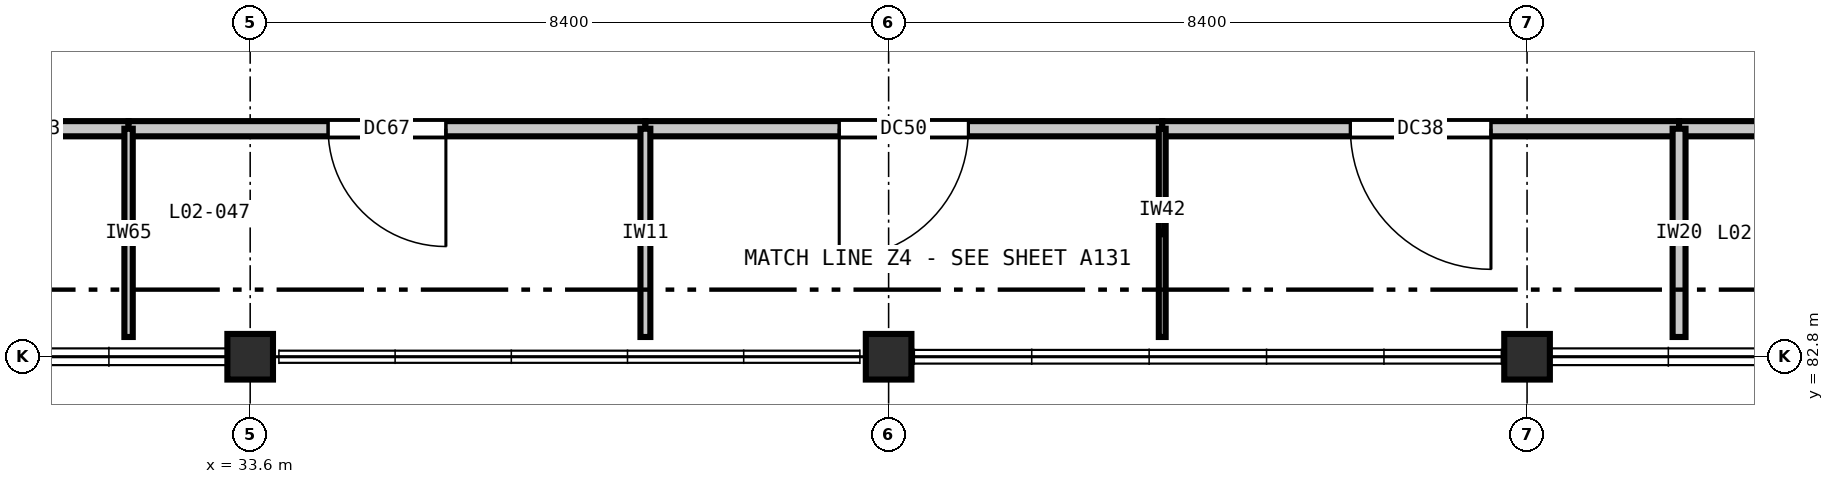
"""IFC4 building model, lengths in metres.
Left out: names, types, materials, properties, quantities, classifications, styles, units other than length and angle.
Written with IfcOpenShell. Run it as: python <this file> out.ifc"""

import sys

from ifc_helpers import new_model, si_unit, direction, frame, frame_2d, origin, origin_2d, place, context, subcontext, project, spatial, rectangle, extrude, element, fill, save


model = new_model("IFC4")
c1 = context("Model", 3, precision=1e-05, world=origin(), true_north=direction((0.0, 1.0)))
c2 = subcontext(c1, "Body", "Model", "MODEL_VIEW")
j1 = project(units=[si_unit("LENGTHUNIT", "METRE"), si_unit("PLANEANGLEUNIT", "RADIAN")], contexts=[c1])
p1 = place(None, origin())
s1 = spatial("IfcSite", under=j1, at=p1, CompositionType="ELEMENT")
p2 = place(p1, origin())
s2 = spatial("IfcBuilding", under=s1, at=p2, CompositionType="ELEMENT")
p3 = place(p2, frame((0.0, 0.0, 10.8)))
s3 = spatial("IfcBuildingStorey", under=s2, at=p3, CompositionType="ELEMENT", Elevation=10.8)
for number, where, z_axis, x_axis in (
    (1, (33.6, 82.8, 0.0), (0.0, 0.0, 1.0), (1.0, 0.0, 0.0)),
    (2, (42.0, 82.8, 0.0), (0.0, 0.0, 1.0), (1.0, 0.0, 0.0)),
    (3, (50.4, 82.8, 0.0), (0.0, 0.0, 1.0), (1.0, 0.0, 0.0)),
):
    element("IfcColumn", number, at=place(p3, frame(where, z_axis=z_axis, x_axis=x_axis)), inside=s3, PredefinedType="COLUMN", context=c2, shape_type="SweptSolid", body=[
        extrude(rectangle(XDim=0.6, YDim=0.6, at=origin_2d()), origin(), (0.0, 0.0, 1.0), 5.4),
    ])
p4 = place(p3, frame((25.2, 85.8, 0.0), z_axis=(0.0, 0.0, 1.0), x_axis=(1.0, 0.0, 0.0)))
e4 = element("IfcWall", 4, at=p4, inside=s3, PredefinedType="PARTITIONING", context=c2, shape_type="SweptSolid", body=[
    extrude(rectangle(XDim=6.8, YDim=0.2, at=frame_2d((3.4, 0.0))), origin(), (0.0, 0.0, 1.0), 5.07),
])
p5 = place(p4, frame((2.675, 0.0, 0.0)))
e5 = element("IfcOpeningElement", 5, at=p5, cuts=e4, PredefinedType="OPENING", context=c2, shape_type="SweptSolid", body=[
    extrude(rectangle(XDim=1.45, YDim=2.25, at=frame_2d((0.725, 1.125))), frame((0.0, 0.11, 0.0), z_axis=(0.0, -1.0, 0.0), x_axis=(1.0, 0.0, 0.0)), (0.0, 0.0, 1.0), 0.22),
])
p6 = place(p3, frame((32.0, 85.8, 0.0), z_axis=(0.0, 0.0, 1.0), x_axis=(1.0, 0.0, 0.0)))
e6 = element("IfcWall", 6, at=p6, inside=s3, PredefinedType="PARTITIONING", context=c2, shape_type="SweptSolid", body=[
    extrude(rectangle(XDim=6.8, YDim=0.2, at=frame_2d((3.4, 0.0))), origin(), (0.0, 0.0, 1.0), 5.07),
])
p7 = place(p6, frame((2.625, 0.0, 0.0)))
e7 = element("IfcOpeningElement", 7, at=p7, cuts=e6, PredefinedType="OPENING", context=c2, shape_type="SweptSolid", body=[
    extrude(rectangle(XDim=1.55, YDim=2.25, at=frame_2d((0.775, 1.125))), frame((0.0, 0.11, 0.0), z_axis=(0.0, -1.0, 0.0), x_axis=(1.0, 0.0, 0.0)), (0.0, 0.0, 1.0), 0.22),
])
p8 = place(p3, frame((38.8, 85.8, 0.0), z_axis=(0.0, 0.0, 1.0), x_axis=(1.0, 0.0, 0.0)))
e8 = element("IfcWall", 8, at=p8, inside=s3, PredefinedType="PARTITIONING", context=c2, shape_type="SweptSolid", body=[
    extrude(rectangle(XDim=6.8, YDim=0.2, at=frame_2d((3.4, 0.0))), origin(), (0.0, 0.0, 1.0), 5.07),
])
p9 = place(p8, frame((2.55, 0.0, 0.0)))
e9 = element("IfcOpeningElement", 9, at=p9, cuts=e8, PredefinedType="OPENING", context=c2, shape_type="SweptSolid", body=[
    extrude(rectangle(XDim=1.7, YDim=2.3, at=frame_2d((0.85, 1.15))), frame((0.0, 0.11, 0.0), z_axis=(0.0, -1.0, 0.0), x_axis=(1.0, 0.0, 0.0)), (0.0, 0.0, 1.0), 0.22),
])
p10 = place(p3, frame((45.6, 85.8, 0.0), z_axis=(0.0, 0.0, 1.0), x_axis=(1.0, 0.0, 0.0)))
e10 = element("IfcWall", 10, at=p10, inside=s3, PredefinedType="PARTITIONING", context=c2, shape_type="SweptSolid", body=[
    extrude(rectangle(XDim=6.8, YDim=0.2, at=frame_2d((3.4, 0.0))), origin(), (0.0, 0.0, 1.0), 5.07),
])
p11 = place(p10, frame((2.475, 0.0, 0.0)))
e11 = element("IfcOpeningElement", 11, at=p11, cuts=e10, PredefinedType="OPENING", context=c2, shape_type="SweptSolid", body=[
    extrude(rectangle(XDim=1.85, YDim=2.3, at=frame_2d((0.925, 1.15))), frame((0.0, 0.11, 0.0), z_axis=(0.0, -1.0, 0.0), x_axis=(1.0, 0.0, 0.0)), (0.0, 0.0, 1.0), 0.22),
])
p12 = place(p3, frame((52.4, 85.8, 0.0), z_axis=(0.0, 0.0, 1.0), x_axis=(1.0, 0.0, 0.0)))
e12 = element("IfcWall", 12, at=p12, inside=s3, PredefinedType="PARTITIONING", context=c2, shape_type="SweptSolid", body=[
    extrude(rectangle(XDim=6.4, YDim=0.2, at=frame_2d((3.2, 0.0))), origin(), (0.0, 0.0, 1.0), 5.07),
])
p13 = place(p12, frame((2.575, 0.0, 0.0)))
e13 = element("IfcOpeningElement", 13, at=p13, cuts=e12, PredefinedType="OPENING", context=c2, shape_type="SweptSolid", body=[
    extrude(rectangle(XDim=1.25, YDim=2.15, at=frame_2d((0.625, 1.075))), frame((0.0, 0.11, 0.0), z_axis=(0.0, -1.0, 0.0), x_axis=(1.0, 0.0, 0.0)), (0.0, 0.0, 1.0), 0.22),
])
p14 = place(p3, frame((32.0, 83.06, 0.0), z_axis=(0.0, 0.0, 1.0), x_axis=(0.0, 1.0, 0.0)))
e14 = element("IfcWall", 14, at=p14, inside=s3, PredefinedType="PARTITIONING", context=c2, shape_type="SweptSolid", body=[
    extrude(rectangle(XDim=2.74, YDim=0.11, at=frame_2d((1.37, 0.0))), origin(), (0.0, 0.0, 1.0), 5.07),
])
p15 = place(p3, frame((38.8, 83.06, 0.0), z_axis=(0.0, 0.0, 1.0), x_axis=(0.0, 1.0, 0.0)))
e15 = element("IfcWall", 15, at=p15, inside=s3, PredefinedType="PARTITIONING", context=c2, shape_type="SweptSolid", body=[
    extrude(rectangle(XDim=2.74, YDim=0.13, at=frame_2d((1.37, 0.0))), origin(), (0.0, 0.0, 1.0), 5.07),
])
p16 = place(p3, frame((45.6, 83.06, 0.0), z_axis=(0.0, 0.0, 1.0), x_axis=(0.0, 1.0, 0.0)))
e16 = element("IfcWall", 16, at=p16, inside=s3, PredefinedType="PARTITIONING", context=c2, shape_type="SweptSolid", body=[
    extrude(rectangle(XDim=2.74, YDim=0.09, at=frame_2d((1.37, 0.0))), origin(), (0.0, 0.0, 1.0), 5.07),
])
p17 = place(p3, frame((52.4, 83.06, 0.0), z_axis=(0.0, 0.0, 1.0), x_axis=(0.0, 1.0, 0.0)))
e17 = element("IfcWall", 17, at=p17, inside=s3, PredefinedType="PARTITIONING", context=c2, shape_type="SweptSolid", body=[
    extrude(rectangle(XDim=2.74, YDim=0.17, at=frame_2d((1.37, 0.0))), origin(), (0.0, 0.0, 1.0), 5.07),
])
p18 = place(p7, frame((1.55, 0.0, 0.0), z_axis=(0.0, 0.0, 1.0), x_axis=(-1.0, 0.0, 0.0)))
e18 = element("IfcDoor", 18, at=p18, inside=s3, OperationType="SINGLE_SWING_LEFT", PredefinedType="DOOR", context=c2, shape_type="SweptSolid", body=[
    extrude(rectangle(XDim=1.55, YDim=2.25, at=frame_2d((0.775, 1.125))), frame((0.0, 0.025, 0.0), z_axis=(0.0, -1.0, 0.0), x_axis=(1.0, 0.0, 0.0)), (0.0, 0.0, 1.0), 0.05),
])
fill(e7, e18)
p19 = place(p9, frame((1.7, 0.0, 0.0), z_axis=(0.0, 0.0, 1.0), x_axis=(-1.0, 0.0, 0.0)))
e19 = element("IfcDoor", 19, at=p19, inside=s3, OperationType="SINGLE_SWING_RIGHT", PredefinedType="DOOR", context=c2, shape_type="SweptSolid", body=[
    extrude(rectangle(XDim=1.7, YDim=2.3, at=frame_2d((0.85, 1.15))), frame((0.0, 0.025, 0.0), z_axis=(0.0, -1.0, 0.0), x_axis=(1.0, 0.0, 0.0)), (0.0, 0.0, 1.0), 0.05),
])
fill(e9, e19)
p20 = place(p11, frame((1.85, 0.0, 0.0), z_axis=(0.0, 0.0, 1.0), x_axis=(-1.0, 0.0, 0.0)))
e20 = element("IfcDoor", 20, at=p20, inside=s3, OperationType="SINGLE_SWING_LEFT", PredefinedType="DOOR", context=c2, shape_type="SweptSolid", body=[
    extrude(rectangle(XDim=1.85, YDim=2.3, at=frame_2d((0.925, 1.15))), frame((0.0, 0.025, 0.0), z_axis=(0.0, -1.0, 0.0), x_axis=(1.0, 0.0, 0.0)), (0.0, 0.0, 1.0), 0.05),
])
fill(e11, e20)
save(model, sys.argv[1])
